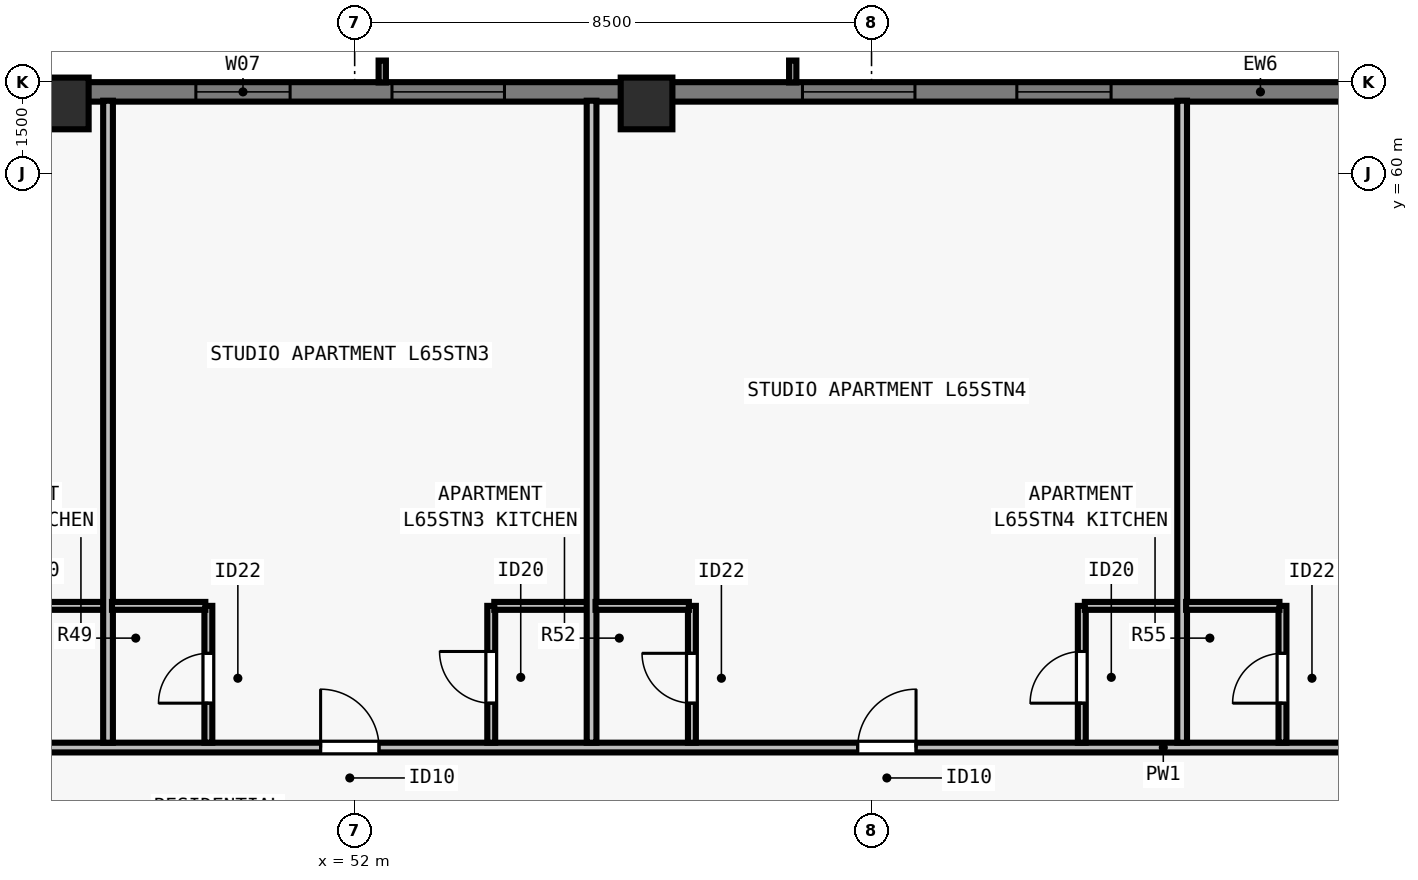
"""IFC4 building model, lengths in metres.
Left out: names, types, materials, properties, quantities, classifications, styles, units other than length and angle.
Written with IfcOpenShell. Run it as: python <this file> out.ifc"""

import sys

from ifc_helpers import new_model, si_unit, direction, frame, frame_2d, origin, origin_2d, place, context, subcontext, project, spatial, rectangle, extrude, element, fill, save


model = new_model("IFC4")
c1 = context("Model", 3, precision=1e-05, world=origin(), true_north=direction((0.0, 1.0)))
c2 = subcontext(c1, "Body", "Model", "MODEL_VIEW")
j1 = project(units=[si_unit("LENGTHUNIT", "METRE"), si_unit("PLANEANGLEUNIT", "RADIAN")], contexts=[c1])
p1 = place(None, origin())
s1 = spatial("IfcSite", under=j1, at=p1, CompositionType="ELEMENT")
p2 = place(p1, origin())
s2 = spatial("IfcBuilding", under=s1, at=p2, CompositionType="ELEMENT")
p3 = place(p2, frame((0.0, 0.0, 237.5)))
s3 = spatial("IfcBuildingStorey", under=s2, at=p3, CompositionType="ELEMENT", Elevation=237.5)
for number, where, z_axis, x_axis in (
    (1, (56.8, 61.15, 0.0), (0.0, 0.0, 1.0), (1.0, 0.0, 0.0)),
    (2, (47.2, 61.15, 0.0), (0.0, 0.0, 1.0), (1.0, 0.0, 0.0)),
):
    element("IfcColumn", number, at=place(p3, frame(where, z_axis=z_axis, x_axis=x_axis)), inside=s3, PredefinedType="COLUMN", context=c2, shape_type="SweptSolid", body=[
        extrude(rectangle(XDim=0.85, YDim=0.85, at=origin_2d()), origin(), (0.0, 0.0, 1.0), 3.5),
    ])
p4 = place(p3, frame((34.5, 61.34, 0.0), z_axis=(0.0, 0.0, 1.0), x_axis=(1.0, 0.0, 0.0)))
e3 = element("IfcWall", 3, at=p4, inside=s3, PredefinedType="SOLIDWALL", context=c2, shape_type="SweptSolid", body=[
    extrude(rectangle(XDim=34.702, YDim=0.32, at=frame_2d((17.351, 0.0))), origin(), (0.0, 0.0, 1.0), 3.29),
])
p5 = place(p4, frame((4.613, 0.0, 0.8)))
e4 = element("IfcOpeningElement", 4, at=p5, cuts=e3, PredefinedType="OPENING", context=c2, shape_type="SweptSolid", body=[
    extrude(rectangle(XDim=1.85, YDim=1.678, at=frame_2d((0.925, 0.839))), frame((0.0, 0.17, 0.0), z_axis=(0.0, -1.0, 0.0), x_axis=(1.0, 0.0, 0.0)), (0.0, 0.0, 1.0), 0.34),
])
p6 = place(p4, frame((8.138, 0.0, 0.8)))
e5 = element("IfcOpeningElement", 5, at=p6, cuts=e3, PredefinedType="OPENING", context=c2, shape_type="SweptSolid", body=[
    extrude(rectangle(XDim=1.55, YDim=1.678, at=frame_2d((0.775, 0.839))), frame((0.0, 0.17, 0.0), z_axis=(0.0, -1.0, 0.0), x_axis=(1.0, 0.0, 0.0)), (0.0, 0.0, 1.0), 0.34),
])
p7 = place(p4, frame((10.113, 0.0, 0.8)))
e6 = element("IfcOpeningElement", 6, at=p7, cuts=e3, PredefinedType="OPENING", context=c2, shape_type="SweptSolid", body=[
    extrude(rectangle(XDim=1.85, YDim=1.678, at=frame_2d((0.925, 0.839))), frame((0.0, 0.17, 0.0), z_axis=(0.0, -1.0, 0.0), x_axis=(1.0, 0.0, 0.0)), (0.0, 0.0, 1.0), 0.34),
])
p8 = place(p4, frame((14.888, 0.0, 0.8)))
e7 = element("IfcOpeningElement", 7, at=p8, cuts=e3, PredefinedType="OPENING", context=c2, shape_type="SweptSolid", body=[
    extrude(rectangle(XDim=1.55, YDim=1.678, at=frame_2d((0.775, 0.839))), frame((0.0, 0.17, 0.0), z_axis=(0.0, -1.0, 0.0), x_axis=(1.0, 0.0, 0.0)), (0.0, 0.0, 1.0), 0.34),
])
p9 = place(p4, frame((18.114, 0.0, 0.8)))
e8 = element("IfcOpeningElement", 8, at=p9, cuts=e3, PredefinedType="OPENING", context=c2, shape_type="SweptSolid", body=[
    extrude(rectangle(XDim=1.85, YDim=1.678, at=frame_2d((0.925, 0.839))), frame((0.0, 0.17, 0.0), z_axis=(0.0, -1.0, 0.0), x_axis=(1.0, 0.0, 0.0)), (0.0, 0.0, 1.0), 0.34),
])
p10 = place(p4, frame((24.864, 0.0, 0.8)))
e9 = element("IfcOpeningElement", 9, at=p10, cuts=e3, PredefinedType="OPENING", context=c2, shape_type="SweptSolid", body=[
    extrude(rectangle(XDim=1.85, YDim=1.678, at=frame_2d((0.925, 0.839))), frame((0.0, 0.17, 0.0), z_axis=(0.0, -1.0, 0.0), x_axis=(1.0, 0.0, 0.0)), (0.0, 0.0, 1.0), 0.34),
])
p11 = place(p4, frame((28.389, 0.0, 0.8)))
e10 = element("IfcOpeningElement", 10, at=p11, cuts=e3, PredefinedType="OPENING", context=c2, shape_type="SweptSolid", body=[
    extrude(rectangle(XDim=1.55, YDim=1.678, at=frame_2d((0.775, 0.839))), frame((0.0, 0.17, 0.0), z_axis=(0.0, -1.0, 0.0), x_axis=(1.0, 0.0, 0.0)), (0.0, 0.0, 1.0), 0.34),
])
p12 = place(p3, frame((29.805, 50.558, 0.0), z_axis=(0.0, 0.0, 1.0), x_axis=(1.0, 0.0, 0.0)))
e11 = element("IfcWall", 11, at=p12, inside=s3, PredefinedType="PARTITIONING", context=c2, shape_type="SweptSolid", body=[
    extrude(rectangle(XDim=44.39, YDim=0.16, at=frame_2d((22.195, 0.0))), origin(), (0.0, 0.0, 1.0), 2.958),
])
p13 = place(p12, frame((3.791, 0.0, 0.0)))
e12 = element("IfcOpeningElement", 12, at=p13, cuts=e11, PredefinedType="OPENING", context=c2, shape_type="SweptSolid", body=[
    extrude(rectangle(XDim=0.96, YDim=2.18, at=frame_2d((0.48, 1.09))), frame((0.0, 0.09, 0.0), z_axis=(0.0, -1.0, 0.0), x_axis=(1.0, 0.0, 0.0)), (0.0, 0.0, 1.0), 0.18),
])
p14 = place(p12, frame((12.803, 0.0, 0.0)))
e13 = element("IfcOpeningElement", 13, at=p14, cuts=e11, PredefinedType="OPENING", context=c2, shape_type="SweptSolid", body=[
    extrude(rectangle(XDim=0.96, YDim=2.18, at=frame_2d((0.48, 1.09))), frame((0.0, 0.09, 0.0), z_axis=(0.0, -1.0, 0.0), x_axis=(1.0, 0.0, 0.0)), (0.0, 0.0, 1.0), 0.18),
])
p15 = place(p12, frame((21.635, 0.0, 0.0)))
e14 = element("IfcOpeningElement", 14, at=p15, cuts=e11, PredefinedType="OPENING", context=c2, shape_type="SweptSolid", body=[
    extrude(rectangle(XDim=0.96, YDim=2.18, at=frame_2d((0.48, 1.09))), frame((0.0, 0.09, 0.0), z_axis=(0.0, -1.0, 0.0), x_axis=(1.0, 0.0, 0.0)), (0.0, 0.0, 1.0), 0.18),
])
p16 = place(p12, frame((30.467, 0.0, 0.0)))
e15 = element("IfcOpeningElement", 15, at=p16, cuts=e11, PredefinedType="OPENING", context=c2, shape_type="SweptSolid", body=[
    extrude(rectangle(XDim=0.96, YDim=2.18, at=frame_2d((0.48, 1.09))), frame((0.0, 0.09, 0.0), z_axis=(0.0, -1.0, 0.0), x_axis=(1.0, 0.0, 0.0)), (0.0, 0.0, 1.0), 0.18),
])
p17 = place(p12, frame((39.559, 0.0, 0.0)))
e16 = element("IfcOpeningElement", 16, at=p17, cuts=e11, PredefinedType="OPENING", context=c2, shape_type="SweptSolid", body=[
    extrude(rectangle(XDim=0.96, YDim=2.18, at=frame_2d((0.48, 1.09))), frame((0.0, 0.09, 0.0), z_axis=(0.0, -1.0, 0.0), x_axis=(1.0, 0.0, 0.0)), (0.0, 0.0, 1.0), 0.18),
])
p18 = place(p3, frame((46.344, 52.887, 0.0), z_axis=(0.0, 0.0, 1.0), x_axis=(1.0, 0.0, 0.0)))
e17 = element("IfcWall", 17, at=p18, inside=s3, PredefinedType="PLUMBINGWALL", context=c2, shape_type="SweptSolid", body=[
    extrude(rectangle(XDim=1.6, YDim=0.13, at=frame_2d((0.8, 0.0))), origin(), (0.0, 0.0, 1.0), 3.29),
])
p19 = place(p3, frame((47.944, 50.637, 0.0), z_axis=(0.0, 0.0, 1.0), x_axis=(0.0, 1.0, 0.0)))
e18 = element("IfcWall", 18, at=p19, inside=s3, PredefinedType="PARTITIONING", context=c2, shape_type="SweptSolid", body=[
    extrude(rectangle(XDim=10.558, YDim=0.16, at=frame_2d((5.279, 0.0))), origin(), (0.0, 0.0, 1.0), 3.29),
])
p20 = place(p3, frame((49.594, 50.637, 0.0), z_axis=(0.0, 0.0, 1.0), x_axis=(0.0, 1.0, 0.0)))
e19 = element("IfcWall", 19, at=p20, inside=s3, PredefinedType="PLUMBINGWALL", context=c2, shape_type="SweptSolid", body=[
    extrude(rectangle(XDim=2.25, YDim=0.13, at=frame_2d((1.125, 0.0))), origin(), (0.0, 0.0, 1.0), 2.958),
])
p21 = place(p20, frame((0.65, 0.0, 0.0)))
e20 = element("IfcOpeningElement", 20, at=p21, cuts=e19, PredefinedType="OPENING", context=c2, shape_type="SweptSolid", body=[
    extrude(rectangle(XDim=0.82, YDim=2.1, at=frame_2d((0.41, 1.05))), frame((0.0, 0.075, 0.0), z_axis=(0.0, -1.0, 0.0), x_axis=(1.0, 0.0, 0.0)), (0.0, 0.0, 1.0), 0.15),
])
p22 = place(p3, frame((48.009, 52.887, 0.0), z_axis=(0.0, 0.0, 1.0), x_axis=(1.0, 0.0, 0.0)))
e21 = element("IfcWall", 21, at=p22, inside=s3, PredefinedType="PLUMBINGWALL", context=c2, shape_type="SweptSolid", body=[
    extrude(rectangle(XDim=1.535, YDim=0.13, at=frame_2d((0.768, 0.0))), origin(), (0.0, 0.0, 1.0), 3.29),
])
p23 = place(p3, frame((54.246, 50.637, 0.0), z_axis=(0.0, 0.0, 1.0), x_axis=(0.0, 1.0, 0.0)))
e22 = element("IfcWall", 22, at=p23, inside=s3, PredefinedType="PLUMBINGWALL", context=c2, shape_type="SweptSolid", body=[
    extrude(rectangle(XDim=2.25, YDim=0.13, at=frame_2d((1.125, 0.0))), origin(), (0.0, 0.0, 1.0), 3.29),
])
p24 = place(p23, frame((0.65, 0.0, 0.0)))
e23 = element("IfcOpeningElement", 23, at=p24, cuts=e22, PredefinedType="OPENING", context=c2, shape_type="SweptSolid", body=[
    extrude(rectangle(XDim=0.85, YDim=2.1, at=frame_2d((0.425, 1.05))), frame((0.0, 0.075, 0.0), z_axis=(0.0, -1.0, 0.0), x_axis=(1.0, 0.0, 0.0)), (0.0, 0.0, 1.0), 0.15),
])
p25 = place(p3, frame((54.296, 52.887, 0.0), z_axis=(0.0, 0.0, 1.0), x_axis=(1.0, 0.0, 0.0)))
e24 = element("IfcWall", 24, at=p25, inside=s3, PredefinedType="PLUMBINGWALL", context=c2, shape_type="SweptSolid", body=[
    extrude(rectangle(XDim=1.6, YDim=0.13, at=frame_2d((0.8, 0.0))), origin(), (0.0, 0.0, 1.0), 3.29),
])
p26 = place(p3, frame((55.896, 50.637, 0.0), z_axis=(0.0, 0.0, 1.0), x_axis=(0.0, 1.0, 0.0)))
e25 = element("IfcWall", 25, at=p26, inside=s3, PredefinedType="PARTITIONING", context=c2, shape_type="SweptSolid", body=[
    extrude(rectangle(XDim=10.558, YDim=0.16, at=frame_2d((5.279, 0.0))), origin(), (0.0, 0.0, 1.0), 2.958),
])
p27 = place(p3, frame((57.546, 50.637, 0.0), z_axis=(0.0, 0.0, 1.0), x_axis=(0.0, 1.0, 0.0)))
e26 = element("IfcWall", 26, at=p27, inside=s3, PredefinedType="PLUMBINGWALL", context=c2, shape_type="SweptSolid", body=[
    extrude(rectangle(XDim=2.25, YDim=0.13, at=frame_2d((1.125, 0.0))), origin(), (0.0, 0.0, 1.0), 3.29),
])
p28 = place(p27, frame((0.65, 0.0, 0.0)))
e27 = element("IfcOpeningElement", 27, at=p28, cuts=e26, PredefinedType="OPENING", context=c2, shape_type="SweptSolid", body=[
    extrude(rectangle(XDim=0.82, YDim=2.1, at=frame_2d((0.41, 1.05))), frame((0.0, 0.075, 0.0), z_axis=(0.0, -1.0, 0.0), x_axis=(1.0, 0.0, 0.0)), (0.0, 0.0, 1.0), 0.15),
])
p29 = place(p3, frame((55.961, 52.887, 0.0), z_axis=(0.0, 0.0, 1.0), x_axis=(1.0, 0.0, 0.0)))
e28 = element("IfcWall", 28, at=p29, inside=s3, PredefinedType="PLUMBINGWALL", context=c2, shape_type="SweptSolid", body=[
    extrude(rectangle(XDim=1.535, YDim=0.13, at=frame_2d((0.768, 0.0))), origin(), (0.0, 0.0, 1.0), 3.29),
])
p30 = place(p3, frame((63.958, 50.637, 0.0), z_axis=(0.0, 0.0, 1.0), x_axis=(0.0, 1.0, 0.0)))
e29 = element("IfcWall", 29, at=p30, inside=s3, PredefinedType="PLUMBINGWALL", context=c2, shape_type="SweptSolid", body=[
    extrude(rectangle(XDim=2.25, YDim=0.13, at=frame_2d((1.125, 0.0))), origin(), (0.0, 0.0, 1.0), 2.573),
])
p31 = place(p30, frame((0.65, 0.0, 0.0)))
e30 = element("IfcOpeningElement", 30, at=p31, cuts=e29, PredefinedType="OPENING", context=c2, shape_type="SweptSolid", body=[
    extrude(rectangle(XDim=0.85, YDim=2.1, at=frame_2d((0.425, 1.05))), frame((0.0, 0.075, 0.0), z_axis=(0.0, -1.0, 0.0), x_axis=(1.0, 0.0, 0.0)), (0.0, 0.0, 1.0), 0.15),
])
p32 = place(p3, frame((64.008, 52.887, 0.0), z_axis=(0.0, 0.0, 1.0), x_axis=(1.0, 0.0, 0.0)))
e31 = element("IfcWall", 31, at=p32, inside=s3, PredefinedType="PLUMBINGWALL", context=c2, shape_type="SweptSolid", body=[
    extrude(rectangle(XDim=1.6, YDim=0.13, at=frame_2d((0.8, 0.0))), origin(), (0.0, 0.0, 1.0), 3.29),
])
p33 = place(p3, frame((65.608, 50.637, 0.0), z_axis=(0.0, 0.0, 1.0), x_axis=(0.0, 1.0, 0.0)))
e32 = element("IfcWall", 32, at=p33, inside=s3, PredefinedType="PARTITIONING", context=c2, shape_type="SweptSolid", body=[
    extrude(rectangle(XDim=10.558, YDim=0.16, at=frame_2d((5.279, 0.0))), origin(), (0.0, 0.0, 1.0), 2.573),
])
p34 = place(p3, frame((67.258, 50.637, 0.0), z_axis=(0.0, 0.0, 1.0), x_axis=(0.0, 1.0, 0.0)))
e33 = element("IfcWall", 33, at=p34, inside=s3, PredefinedType="PLUMBINGWALL", context=c2, shape_type="SweptSolid", body=[
    extrude(rectangle(XDim=2.25, YDim=0.13, at=frame_2d((1.125, 0.0))), origin(), (0.0, 0.0, 1.0), 3.29),
])
p35 = place(p34, frame((0.65, 0.0, 0.0)))
e34 = element("IfcOpeningElement", 34, at=p35, cuts=e33, PredefinedType="OPENING", context=c2, shape_type="SweptSolid", body=[
    extrude(rectangle(XDim=0.82, YDim=2.1, at=frame_2d((0.41, 1.05))), frame((0.0, 0.075, 0.0), z_axis=(0.0, -1.0, 0.0), x_axis=(1.0, 0.0, 0.0)), (0.0, 0.0, 1.0), 0.15),
])
p36 = place(p3, frame((65.673, 52.887, 0.0), z_axis=(0.0, 0.0, 1.0), x_axis=(1.0, 0.0, 0.0)))
e35 = element("IfcWall", 35, at=p36, inside=s3, PredefinedType="PLUMBINGWALL", context=c2, shape_type="SweptSolid", body=[
    extrude(rectangle(XDim=1.535, YDim=0.13, at=frame_2d((0.768, 0.0))), origin(), (0.0, 0.0, 1.0), 3.29),
])
p37 = place(p8, origin())
e36 = element("IfcWindow", 36, at=p37, inside=s3, PartitioningType="SINGLE_PANEL", PredefinedType="WINDOW", context=c2, shape_type="SweptSolid", body=[
    extrude(rectangle(XDim=1.55, YDim=1.678, at=frame_2d((0.775, 0.839))), frame((0.0, -0.05, 0.0), z_axis=(0.0, -1.0, 0.0), x_axis=(1.0, 0.0, 0.0)), (0.0, 0.0, 1.0), 0.06),
])
fill(e7, e36)
p38 = place(p9, origin())
e37 = element("IfcWindow", 37, at=p38, inside=s3, PartitioningType="SINGLE_PANEL", PredefinedType="WINDOW", context=c2, shape_type="SweptSolid", body=[
    extrude(rectangle(XDim=1.85, YDim=1.678, at=frame_2d((0.925, 0.839))), frame((0.0, -0.05, 0.0), z_axis=(0.0, -1.0, 0.0), x_axis=(1.0, 0.0, 0.0)), (0.0, 0.0, 1.0), 0.06),
])
fill(e8, e37)
p39 = place(p10, origin())
e38 = element("IfcWindow", 38, at=p39, inside=s3, PartitioningType="SINGLE_PANEL", PredefinedType="WINDOW", context=c2, shape_type="SweptSolid", body=[
    extrude(rectangle(XDim=1.85, YDim=1.678, at=frame_2d((0.925, 0.839))), frame((0.0, -0.05, 0.0), z_axis=(0.0, -1.0, 0.0), x_axis=(1.0, 0.0, 0.0)), (0.0, 0.0, 1.0), 0.06),
])
fill(e9, e38)
p40 = place(p11, origin())
e39 = element("IfcWindow", 39, at=p40, inside=s3, PartitioningType="SINGLE_PANEL", PredefinedType="WINDOW", context=c2, shape_type="SweptSolid", body=[
    extrude(rectangle(XDim=1.55, YDim=1.678, at=frame_2d((0.775, 0.839))), frame((0.0, -0.05, 0.0), z_axis=(0.0, -1.0, 0.0), x_axis=(1.0, 0.0, 0.0)), (0.0, 0.0, 1.0), 0.06),
])
fill(e10, e39)
p41 = place(p21, origin())
e40 = element("IfcDoor", 40, at=p41, inside=s3, OperationType="SINGLE_SWING_LEFT", PredefinedType="DOOR", context=c2, shape_type="SweptSolid", body=[
    extrude(rectangle(XDim=0.82, YDim=2.1, at=frame_2d((0.41, 1.05))), frame((0.0, 0.025, 0.0), z_axis=(0.0, -1.0, 0.0), x_axis=(1.0, 0.0, 0.0)), (0.0, 0.0, 1.0), 0.05),
])
fill(e20, e40)
p42 = place(p24, origin())
e41 = element("IfcDoor", 41, at=p42, inside=s3, OperationType="SINGLE_SWING_RIGHT", PredefinedType="DOOR", context=c2, shape_type="SweptSolid", body=[
    extrude(rectangle(XDim=0.85, YDim=2.1, at=frame_2d((0.425, 1.05))), frame((0.0, 0.025, 0.0), z_axis=(0.0, -1.0, 0.0), x_axis=(1.0, 0.0, 0.0)), (0.0, 0.0, 1.0), 0.05),
])
fill(e23, e41)
p43 = place(p15, origin())
e42 = element("IfcDoor", 42, at=p43, inside=s3, OperationType="SINGLE_SWING_LEFT", PredefinedType="DOOR", context=c2, shape_type="SweptSolid", body=[
    extrude(rectangle(XDim=0.96, YDim=2.18, at=frame_2d((0.48, 1.09))), frame((0.0, 0.025, 0.0), z_axis=(0.0, -1.0, 0.0), x_axis=(1.0, 0.0, 0.0)), (0.0, 0.0, 1.0), 0.05),
])
fill(e14, e42)
p44 = place(p28, origin())
e43 = element("IfcDoor", 43, at=p44, inside=s3, OperationType="SINGLE_SWING_RIGHT", PredefinedType="DOOR", context=c2, shape_type="SweptSolid", body=[
    extrude(rectangle(XDim=0.82, YDim=2.1, at=frame_2d((0.41, 1.05))), frame((0.0, 0.025, 0.0), z_axis=(0.0, -1.0, 0.0), x_axis=(1.0, 0.0, 0.0)), (0.0, 0.0, 1.0), 0.05),
])
fill(e27, e43)
p45 = place(p31, origin())
e44 = element("IfcDoor", 44, at=p45, inside=s3, OperationType="SINGLE_SWING_LEFT", PredefinedType="DOOR", context=c2, shape_type="SweptSolid", body=[
    extrude(rectangle(XDim=0.85, YDim=2.1, at=frame_2d((0.425, 1.05))), frame((0.0, 0.025, 0.0), z_axis=(0.0, -1.0, 0.0), x_axis=(1.0, 0.0, 0.0)), (0.0, 0.0, 1.0), 0.05),
])
fill(e30, e44)
p46 = place(p16, origin())
e45 = element("IfcDoor", 45, at=p46, inside=s3, OperationType="SINGLE_SWING_RIGHT", PredefinedType="DOOR", context=c2, shape_type="SweptSolid", body=[
    extrude(rectangle(XDim=0.96, YDim=2.18, at=frame_2d((0.48, 1.09))), frame((0.0, 0.025, 0.0), z_axis=(0.0, -1.0, 0.0), x_axis=(1.0, 0.0, 0.0)), (0.0, 0.0, 1.0), 0.05),
])
fill(e15, e45)
p47 = place(p35, origin())
e46 = element("IfcDoor", 46, at=p47, inside=s3, OperationType="SINGLE_SWING_LEFT", PredefinedType="DOOR", context=c2, shape_type="SweptSolid", body=[
    extrude(rectangle(XDim=0.82, YDim=2.1, at=frame_2d((0.41, 1.05))), frame((0.0, 0.025, 0.0), z_axis=(0.0, -1.0, 0.0), x_axis=(1.0, 0.0, 0.0)), (0.0, 0.0, 1.0), 0.05),
])
fill(e34, e46)
save(model, sys.argv[1])
